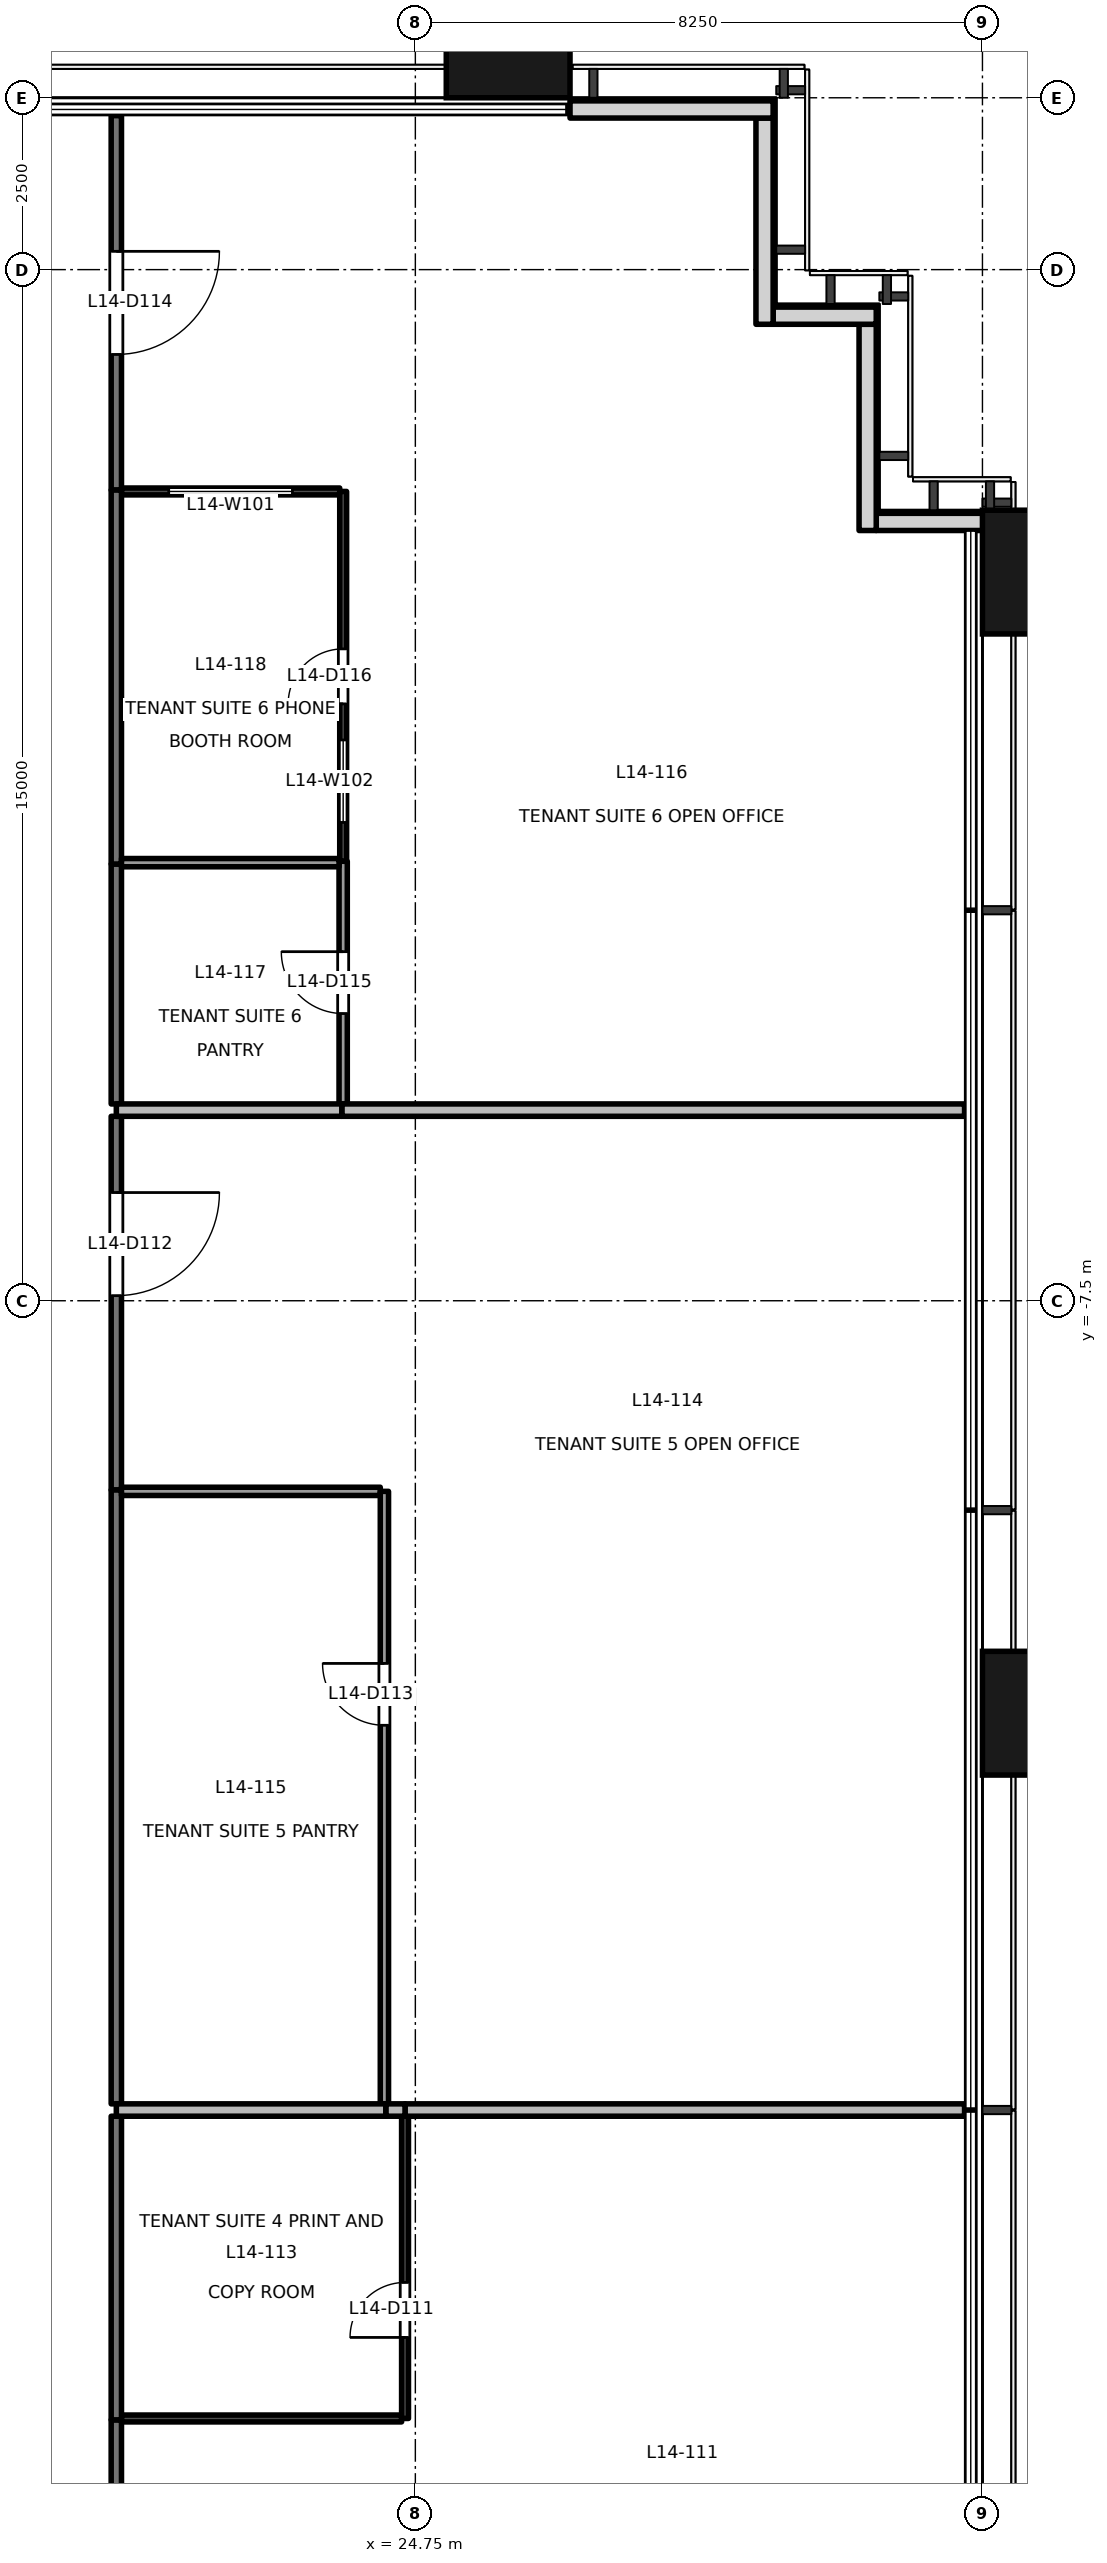
"""IFC4 building model, lengths in metres.
Left out: names, types, materials, properties, quantities, classifications, styles, units other than length and angle.
Written with IfcOpenShell. Run it as: python <this file> out.ifc"""

import sys

from ifc_helpers import new_model, si_unit, direction, frame, frame_2d, origin, origin_2d, place, context, subcontext, project, spatial, rectangle, extrude, element, fill, save


model = new_model("IFC4")
c1 = context("Model", 3, precision=1e-05, world=origin(), true_north=direction((0.0, 1.0)))
c2 = subcontext(c1, "Body", "Model", "MODEL_VIEW")
j1 = project(units=[si_unit("LENGTHUNIT", "METRE"), si_unit("PLANEANGLEUNIT", "RADIAN")], contexts=[c1])
p1 = place(None, origin())
s1 = spatial("IfcSite", under=j1, at=p1, CompositionType="ELEMENT")
p2 = place(p1, origin())
s2 = spatial("IfcBuilding", under=s1, at=p2, CompositionType="ELEMENT")
p3 = place(p2, frame((0.0, 0.0, 65.2)))
s3 = spatial("IfcBuildingStorey", under=s2, at=p3, CompositionType="ELEMENT", Elevation=65.2)
for number, where, z_axis, x_axis in (
    (1, (33.9, -13.5, -0.2), (0.0, 0.0, 1.0), (0.0, 1.0, 0.0)),
    (2, (33.9, 3.1, -0.2), (0.0, 0.0, 1.0), (0.0, 1.0, 0.0)),
    (3, (26.1, 10.9, -0.2), (0.0, 0.0, 1.0), (1.0, 0.0, 0.0)),
):
    element("IfcColumn", number, at=place(p3, frame(where, z_axis=z_axis, x_axis=x_axis)), inside=s3, PredefinedType="COLUMN", context=c2, shape_type="SweptSolid", body=[
        extrude(rectangle(XDim=1.8, YDim=1.8, at=origin_2d()), origin(), (0.0, 0.0, 1.0), 4.1),
    ])
p4 = place(p3, frame((33.005, 3.83, 0.0), z_axis=(0.0, 0.0, 1.0), x_axis=(-1.0, 0.0, 0.0)))
e4 = element("IfcWall", 4, at=p4, inside=s3, PredefinedType="SOLIDWALL", context=c2, shape_type="SweptSolid", body=[
    extrude(rectangle(XDim=1.55, YDim=0.25, at=frame_2d((0.775, 0.0))), origin(), (0.0, 0.0, 1.0), 3.9),
])
p5 = place(p3, frame((31.33, 3.705, 0.0), z_axis=(0.0, 0.0, 1.0), x_axis=(0.0, 1.0, 0.0)))
e5 = element("IfcWall", 5, at=p5, inside=s3, PredefinedType="SOLIDWALL", context=c2, shape_type="SweptSolid", body=[
    extrude(rectangle(XDim=3.0, YDim=0.25, at=frame_2d((1.5, 0.0))), origin(), (0.0, 0.0, 1.0), 3.9),
])
p6 = place(p3, frame((31.455, 6.83, 0.0), z_axis=(0.0, 0.0, 1.0), x_axis=(-1.0, 0.0, 0.0)))
e6 = element("IfcWall", 6, at=p6, inside=s3, PredefinedType="SOLIDWALL", context=c2, shape_type="SweptSolid", body=[
    extrude(rectangle(XDim=1.5, YDim=0.25, at=frame_2d((0.75, 0.0))), origin(), (0.0, 0.0, 1.0), 3.9),
])
p7 = place(p3, frame((29.83, 6.705, 0.0), z_axis=(0.0, 0.0, 1.0), x_axis=(0.0, 1.0, 0.0)))
e7 = element("IfcWall", 7, at=p7, inside=s3, PredefinedType="SOLIDWALL", context=c2, shape_type="SweptSolid", body=[
    extrude(rectangle(XDim=3.0, YDim=0.25, at=frame_2d((1.5, 0.0))), origin(), (0.0, 0.0, 1.0), 3.9),
])
p8 = place(p3, frame((29.955, 9.83, 0.0), z_axis=(0.0, 0.0, 1.0), x_axis=(-1.0, 0.0, 0.0)))
e8 = element("IfcWall", 8, at=p8, inside=s3, PredefinedType="SOLIDWALL", context=c2, shape_type="SweptSolid", body=[
    extrude(rectangle(XDim=2.955, YDim=0.25, at=frame_2d((1.478, 0.0))), origin(), (0.0, 0.0, 1.0), 3.9),
])
p9 = place(p3, frame((20.4, -23.78, 0.0), z_axis=(0.0, 0.0, 1.0), x_axis=(0.0, -1.0, 0.0)))
e9 = element("IfcWall", 9, at=p9, inside=s3, PredefinedType="PARTITIONING", context=c2, shape_type="SweptSolid", body=[
    extrude(rectangle(XDim=3.86, YDim=0.15, at=frame_2d((1.93, 0.0))), origin(), (0.0, 0.0, 1.0), 3.3),
])
p10 = place(p9, frame((2.095, 0.0, 0.0)))
e10 = element("IfcOpeningElement", 10, at=p10, cuts=e9, PredefinedType="OPENING", context=c2, shape_type="SweptSolid", body=[
    extrude(rectangle(XDim=0.9, YDim=2.1, at=frame_2d((0.45, 1.05))), frame((0.0, 0.085, 0.0), z_axis=(0.0, -1.0, 0.0), x_axis=(1.0, 0.0, 0.0)), (0.0, 0.0, 1.0), 0.171),
])
p11 = place(p3, frame((20.4, -19.363, 0.0), z_axis=(0.0, 0.0, 1.0), x_axis=(0.0, -1.0, 0.0)))
e11 = element("IfcWall", 11, at=p11, inside=s3, PredefinedType="PARTITIONING", context=c2, shape_type="SweptSolid", body=[
    extrude(rectangle(XDim=4.417, YDim=0.15, at=frame_2d((2.208, 0.0))), origin(), (0.0, 0.0, 1.0), 3.3),
])
p12 = place(p3, frame((20.4, -4.817, 0.0), z_axis=(0.0, 0.0, 1.0), x_axis=(0.0, -1.0, 0.0)))
e12 = element("IfcWall", 12, at=p12, inside=s3, PredefinedType="PARTITIONING", context=c2, shape_type="SweptSolid", body=[
    extrude(rectangle(XDim=5.436, YDim=0.15, at=frame_2d((2.718, 0.0))), origin(), (0.0, 0.0, 1.0), 3.3),
])
p13 = place(p12, frame((1.109, 0.0, 0.0)))
e13 = element("IfcOpeningElement", 13, at=p13, cuts=e12, PredefinedType="OPENING", context=c2, shape_type="SweptSolid", body=[
    extrude(rectangle(XDim=1.5, YDim=2.1, at=frame_2d((0.75, 1.05))), frame((0.0, 0.085, 0.0), z_axis=(0.0, -1.0, 0.0), x_axis=(1.0, 0.0, 0.0)), (0.0, 0.0, 1.0), 0.171),
])
p14 = place(p3, frame((20.4, -10.253, 0.0), z_axis=(0.0, 0.0, 1.0), x_axis=(0.0, -1.0, 0.0)))
e14 = element("IfcWall", 14, at=p14, inside=s3, PredefinedType="PARTITIONING", context=c2, shape_type="SweptSolid", body=[
    extrude(rectangle(XDim=8.93, YDim=0.15, at=frame_2d((4.465, 0.0))), origin(), (0.0, 0.0, 1.0), 3.3),
])
p15 = place(p3, frame((20.4, 9.74, 0.0), z_axis=(0.0, 0.0, 1.0), x_axis=(0.0, -1.0, 0.0)))
e15 = element("IfcWall", 15, at=p15, inside=s3, PredefinedType="PARTITIONING", context=c2, shape_type="SweptSolid", body=[
    extrude(rectangle(XDim=5.447, YDim=0.15, at=frame_2d((2.724, 0.0))), origin(), (0.0, 0.0, 1.0), 3.9),
])
p16 = place(p15, frame((1.974, 0.0, 0.0)))
e16 = element("IfcOpeningElement", 16, at=p16, cuts=e15, PredefinedType="OPENING", context=c2, shape_type="SweptSolid", body=[
    extrude(rectangle(XDim=1.5, YDim=2.1, at=frame_2d((0.75, 1.05))), frame((0.0, 0.085, 0.0), z_axis=(0.0, -1.0, 0.0), x_axis=(1.0, 0.0, 0.0)), (0.0, 0.0, 1.0), 0.171),
])
p17 = place(p3, frame((20.4, -1.147, 0.0), z_axis=(0.0, 0.0, 1.0), x_axis=(0.0, -1.0, 0.0)))
e17 = element("IfcWall", 17, at=p17, inside=s3, PredefinedType="PARTITIONING", context=c2, shape_type="SweptSolid", body=[
    extrude(rectangle(XDim=3.49, YDim=0.15, at=frame_2d((1.745, 0.0))), origin(), (0.0, 0.0, 1.0), 3.3),
])
p18 = place(p3, frame((20.4, 4.293, 0.0), z_axis=(0.0, 0.0, 1.0), x_axis=(0.0, -1.0, 0.0)))
e18 = element("IfcWall", 18, at=p18, inside=s3, PredefinedType="PARTITIONING", context=c2, shape_type="SweptSolid", body=[
    extrude(rectangle(XDim=5.44, YDim=0.15, at=frame_2d((2.72, 0.0))), origin(), (0.0, 0.0, 1.0), 3.3),
])
p19 = place(p3, frame((20.475, -23.76, 0.0), z_axis=(0.0, 0.0, 1.0), x_axis=(1.0, 0.0, 0.0)))
e19 = element("IfcWall", 19, at=p19, inside=s3, PredefinedType="PARTITIONING", context=c2, shape_type="SweptSolid", body=[
    extrude(rectangle(XDim=4.075, YDim=0.1, at=frame_2d((2.038, 0.0))), origin(), (0.0, 0.0, 1.0), 3.9),
])
p20 = place(p3, frame((24.6, -23.76, 0.0), z_axis=(0.0, 0.0, 1.0), x_axis=(0.0, 1.0, 0.0)))
e20 = element("IfcWall", 20, at=p20, inside=s3, PredefinedType="PARTITIONING", context=c2, shape_type="SweptSolid", body=[
    extrude(rectangle(XDim=4.397, YDim=0.1, at=frame_2d((2.198, 0.0))), origin(), (0.0, 0.0, 1.0), 3.3),
])
p21 = place(p20, frame((1.179, 0.0, 0.0)))
e21 = element("IfcOpeningElement", 21, at=p21, cuts=e20, PredefinedType="OPENING", context=c2, shape_type="SweptSolid", body=[
    extrude(rectangle(XDim=0.8, YDim=2.1, at=frame_2d((0.4, 1.05))), frame((0.0, 0.061, 0.0), z_axis=(0.0, -1.0, 0.0), x_axis=(1.0, 0.0, 0.0)), (0.0, 0.0, 1.0), 0.121),
])
p22 = place(p3, frame((24.6, -19.273, 0.0), z_axis=(0.0, 0.0, 1.0), x_axis=(1.0, 0.0, 0.0)))
e22 = element("IfcWall", 22, at=p22, inside=s3, PredefinedType="PARTITIONING", context=c2, shape_type="SweptSolid", body=[
    extrude(rectangle(XDim=8.14, YDim=0.18, at=frame_2d((4.07, 0.0))), origin(), (0.0, 0.0, 1.0), 3.9),
])
p23 = place(p3, frame((24.32, -19.273, 0.0), z_axis=(0.0, 0.0, 1.0), x_axis=(1.0, 0.0, 0.0)))
e23 = element("IfcWall", 23, at=p23, inside=s3, PredefinedType="PARTITIONING", context=c2, shape_type="SweptSolid", body=[
    extrude(rectangle(XDim=0.28, YDim=0.18, at=frame_2d((0.14, 0.0))), origin(), (0.0, 0.0, 1.0), 3.9),
])
p24 = place(p3, frame((20.4, -19.273, 0.0), z_axis=(0.0, 0.0, 1.0), x_axis=(1.0, 0.0, 0.0)))
e24 = element("IfcWall", 24, at=p24, inside=s3, PredefinedType="PARTITIONING", context=c2, shape_type="SweptSolid", body=[
    extrude(rectangle(XDim=3.92, YDim=0.18, at=frame_2d((1.96, 0.0))), origin(), (0.0, 0.0, 1.0), 3.9),
])
p25 = place(p3, frame((24.24, -10.273, 0.0), z_axis=(0.0, 0.0, 1.0), x_axis=(-1.0, 0.0, 0.0)))
e25 = element("IfcWall", 25, at=p25, inside=s3, PredefinedType="PARTITIONING", context=c2, shape_type="SweptSolid", body=[
    extrude(rectangle(XDim=3.765, YDim=0.12, at=frame_2d((1.882, 0.0))), origin(), (0.0, 0.0, 1.0), 3.9),
])
p26 = place(p3, frame((24.3, -19.183, 0.0), z_axis=(0.0, 0.0, 1.0), x_axis=(0.0, 1.0, 0.0)))
e26 = element("IfcWall", 26, at=p26, inside=s3, PredefinedType="PARTITIONING", context=c2, shape_type="SweptSolid", body=[
    extrude(rectangle(XDim=8.91, YDim=0.12, at=frame_2d((4.455, 0.0))), origin(), (0.0, 0.0, 1.0), 3.3),
])
p27 = place(p26, frame((5.507, 0.0, 0.0)))
e27 = element("IfcOpeningElement", 27, at=p27, cuts=e26, PredefinedType="OPENING", context=c2, shape_type="SweptSolid", body=[
    extrude(rectangle(XDim=0.9, YDim=2.1, at=frame_2d((0.45, 1.05))), frame((0.0, 0.071, 0.0), z_axis=(0.0, -1.0, 0.0), x_axis=(1.0, 0.0, 0.0)), (0.0, 0.0, 1.0), 0.141),
])
p28 = place(p3, frame((23.68, -4.727, 0.0), z_axis=(0.0, 0.0, 1.0), x_axis=(1.0, 0.0, 0.0)))
e28 = element("IfcWall", 28, at=p28, inside=s3, PredefinedType="PARTITIONING", context=c2, shape_type="SweptSolid", body=[
    extrude(rectangle(XDim=9.06, YDim=0.18, at=frame_2d((4.53, 0.0))), origin(), (0.0, 0.0, 1.0), 3.3),
])
p29 = place(p3, frame((20.4, -4.727, 0.0), z_axis=(0.0, 0.0, 1.0), x_axis=(1.0, 0.0, 0.0)))
e29 = element("IfcWall", 29, at=p29, inside=s3, PredefinedType="PARTITIONING", context=c2, shape_type="SweptSolid", body=[
    extrude(rectangle(XDim=3.28, YDim=0.18, at=frame_2d((1.64, 0.0))), origin(), (0.0, 0.0, 1.0), 3.3),
])
p30 = place(p3, frame((23.7, -4.637, 0.0), z_axis=(0.0, 0.0, 1.0), x_axis=(0.0, 1.0, 0.0)))
e30 = element("IfcWall", 30, at=p30, inside=s3, PredefinedType="PARTITIONING", context=c2, shape_type="SweptSolid", body=[
    extrude(rectangle(XDim=3.53, YDim=0.12, at=frame_2d((1.765, 0.0))), origin(), (0.0, 0.0, 1.0), 3.3),
])
p31 = place(p30, frame((1.315, 0.0, 0.0)))
e31 = element("IfcOpeningElement", 31, at=p31, cuts=e30, PredefinedType="OPENING", context=c2, shape_type="SweptSolid", body=[
    extrude(rectangle(XDim=0.9, YDim=2.1, at=frame_2d((0.45, 1.05))), frame((0.0, 0.071, 0.0), z_axis=(0.0, -1.0, 0.0), x_axis=(1.0, 0.0, 0.0)), (0.0, 0.0, 1.0), 0.141),
])
p32 = place(p3, frame((23.65, 4.273, 0.0), z_axis=(0.0, 0.0, 1.0), x_axis=(-1.0, 0.0, 0.0)))
e32 = element("IfcWall", 32, at=p32, inside=s3, PredefinedType="PARTITIONING", context=c2, shape_type="SweptSolid", body=[
    extrude(rectangle(XDim=3.175, YDim=0.1, at=frame_2d((1.587, 0.0))), origin(), (0.0, 0.0, 1.0), 3.9),
])
p33 = place(p32, frame((0.688, 0.0, 0.9)))
e33 = element("IfcOpeningElement", 33, at=p33, cuts=e32, PredefinedType="OPENING", context=c2, shape_type="SweptSolid", body=[
    extrude(rectangle(XDim=1.8, YDim=1.2, at=frame_2d((0.9, 0.6))), frame((0.0, 0.061, 0.0), z_axis=(0.0, -1.0, 0.0), x_axis=(1.0, 0.0, 0.0)), (0.0, 0.0, 1.0), 0.121),
])
p34 = place(p3, frame((23.7, -1.107, 0.0), z_axis=(0.0, 0.0, 1.0), x_axis=(0.0, 1.0, 0.0)))
e34 = element("IfcWall", 34, at=p34, inside=s3, PredefinedType="PARTITIONING", context=c2, shape_type="SweptSolid", body=[
    extrude(rectangle(XDim=5.38, YDim=0.1, at=frame_2d((2.69, 0.0))), origin(), (0.0, 0.0, 1.0), 3.3),
])
p35 = place(p34, frame((2.29, 0.0, 0.0)))
e35 = element("IfcOpeningElement", 35, at=p35, cuts=e34, PredefinedType="OPENING", context=c2, shape_type="SweptSolid", body=[
    extrude(rectangle(XDim=0.8, YDim=2.1, at=frame_2d((0.4, 1.05))), frame((0.0, 0.061, 0.0), z_axis=(0.0, -1.0, 0.0), x_axis=(1.0, 0.0, 0.0)), (0.0, 0.0, 1.0), 0.121),
])
p36 = place(p34, frame((0.565, 0.0, 0.9)))
e36 = element("IfcOpeningElement", 36, at=p36, cuts=e34, PredefinedType="OPENING", context=c2, shape_type="SweptSolid", body=[
    extrude(rectangle(XDim=1.2, YDim=1.2, at=frame_2d((0.6, 0.6))), frame((0.0, 0.061, 0.0), z_axis=(0.0, -1.0, 0.0), x_axis=(1.0, 0.0, 0.0)), (0.0, 0.0, 1.0), 0.121),
])
p37 = place(p3, frame((20.475, -1.127, 0.0), z_axis=(0.0, 0.0, 1.0), x_axis=(1.0, 0.0, 0.0)))
e37 = element("IfcWall", 37, at=p37, inside=s3, PredefinedType="PARTITIONING", context=c2, shape_type="SweptSolid", body=[
    extrude(rectangle(XDim=3.165, YDim=0.12, at=frame_2d((1.583, 0.0))), origin(), (0.0, 0.0, 1.0), 3.9),
])
p38 = place(p21, origin())
e38 = element("IfcDoor", 38, at=p38, inside=s3, OperationType="SINGLE_SWING_LEFT", PredefinedType="DOOR", context=c2, shape_type="SweptSolid", body=[
    extrude(rectangle(XDim=0.8, YDim=2.1, at=frame_2d((0.4, 1.05))), frame((0.0, 0.025, 0.0), z_axis=(0.0, -1.0, 0.0), x_axis=(1.0, 0.0, 0.0)), (0.0, 0.0, 1.0), 0.05),
])
fill(e21, e38)
p39 = place(p13, origin())
e39 = element("IfcDoor", 39, at=p39, inside=s3, OperationType="DOUBLE_DOOR_SINGLE_SWING", PredefinedType="DOOR", context=c2, shape_type="SweptSolid", body=[
    extrude(rectangle(XDim=1.5, YDim=2.1, at=frame_2d((0.75, 1.05))), frame((0.0, 0.025, 0.0), z_axis=(0.0, -1.0, 0.0), x_axis=(1.0, 0.0, 0.0)), (0.0, 0.0, 1.0), 0.05),
])
fill(e13, e39)
p40 = place(p27, origin())
e40 = element("IfcDoor", 40, at=p40, inside=s3, OperationType="SINGLE_SWING_RIGHT", PredefinedType="DOOR", context=c2, shape_type="SweptSolid", body=[
    extrude(rectangle(XDim=0.9, YDim=2.1, at=frame_2d((0.45, 1.05))), frame((0.0, 0.025, 0.0), z_axis=(0.0, -1.0, 0.0), x_axis=(1.0, 0.0, 0.0)), (0.0, 0.0, 1.0), 0.05),
])
fill(e27, e40)
p41 = place(p16, origin())
e41 = element("IfcDoor", 41, at=p41, inside=s3, OperationType="DOUBLE_DOOR_SINGLE_SWING", PredefinedType="DOOR", context=c2, shape_type="SweptSolid", body=[
    extrude(rectangle(XDim=1.5, YDim=2.1, at=frame_2d((0.75, 1.05))), frame((0.0, 0.025, 0.0), z_axis=(0.0, -1.0, 0.0), x_axis=(1.0, 0.0, 0.0)), (0.0, 0.0, 1.0), 0.05),
])
fill(e16, e41)
p42 = place(p31, origin())
e42 = element("IfcDoor", 42, at=p42, inside=s3, OperationType="SINGLE_SWING_RIGHT", PredefinedType="DOOR", context=c2, shape_type="SweptSolid", body=[
    extrude(rectangle(XDim=0.9, YDim=2.1, at=frame_2d((0.45, 1.05))), frame((0.0, 0.025, 0.0), z_axis=(0.0, -1.0, 0.0), x_axis=(1.0, 0.0, 0.0)), (0.0, 0.0, 1.0), 0.05),
])
fill(e31, e42)
p43 = place(p35, origin())
e43 = element("IfcDoor", 43, at=p43, inside=s3, OperationType="SINGLE_SWING_LEFT", PredefinedType="DOOR", context=c2, shape_type="SweptSolid", body=[
    extrude(rectangle(XDim=0.8, YDim=2.1, at=frame_2d((0.4, 1.05))), frame((0.0, 0.025, 0.0), z_axis=(0.0, -1.0, 0.0), x_axis=(1.0, 0.0, 0.0)), (0.0, 0.0, 1.0), 0.05),
])
fill(e35, e43)
p44 = place(p33, origin())
e44 = element("IfcWindow", 44, at=p44, inside=s3, PartitioningType="SINGLE_PANEL", PredefinedType="WINDOW", context=c2, shape_type="SweptSolid", body=[
    extrude(rectangle(XDim=1.8, YDim=1.2, at=frame_2d((0.9, 0.6))), frame((0.0, 0.03, 0.0), z_axis=(0.0, -1.0, 0.0), x_axis=(1.0, 0.0, 0.0)), (0.0, 0.0, 1.0), 0.06),
])
fill(e33, e44)
p45 = place(p36, origin())
e45 = element("IfcWindow", 45, at=p45, inside=s3, PartitioningType="SINGLE_PANEL", PredefinedType="WINDOW", context=c2, shape_type="SweptSolid", body=[
    extrude(rectangle(XDim=1.2, YDim=1.2, at=frame_2d((0.6, 0.6))), frame((0.0, 0.03, 0.0), z_axis=(0.0, -1.0, 0.0), x_axis=(1.0, 0.0, 0.0)), (0.0, 0.0, 1.0), 0.06),
])
fill(e36, e45)
save(model, sys.argv[1])
